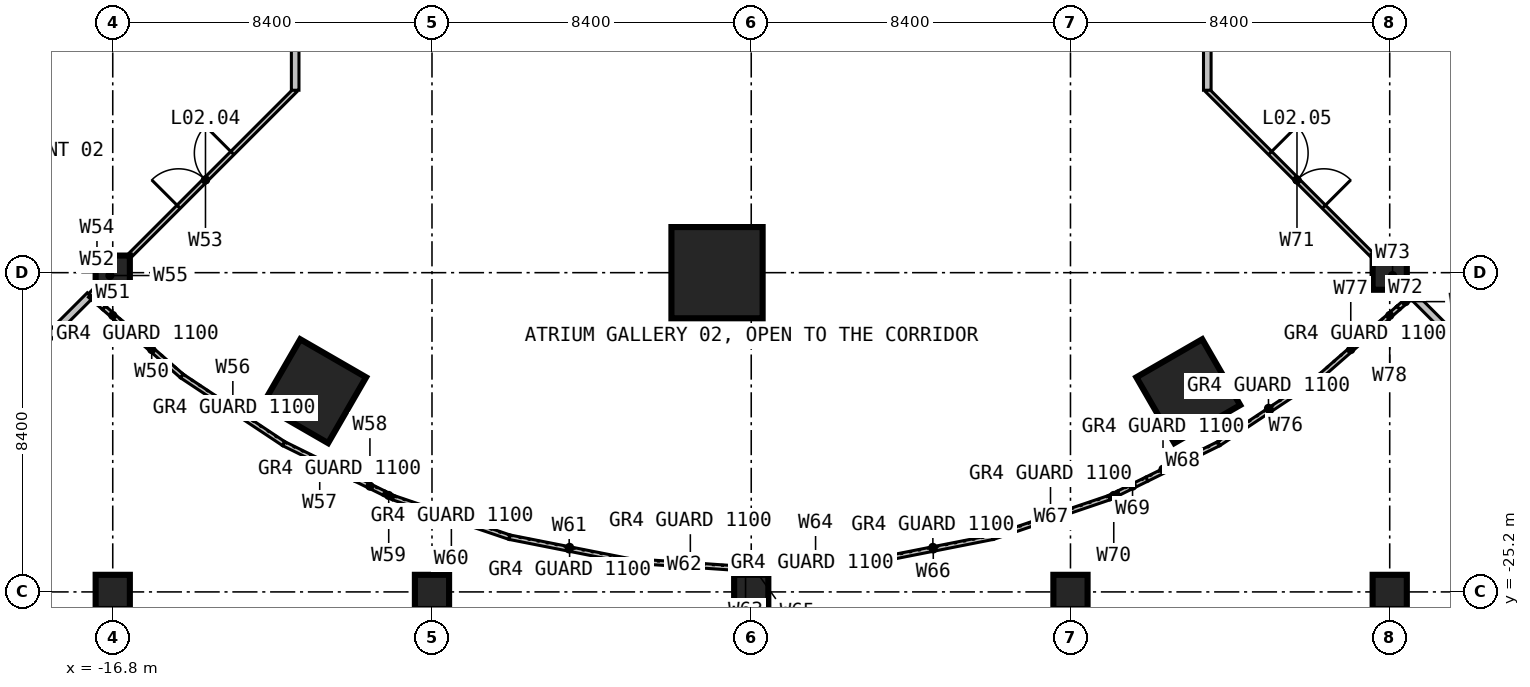
"""IFC4 building model, lengths in metres.
Left out: names, types, materials, properties, quantities, classifications, styles, units other than length and angle.
Written with IfcOpenShell. Run it as: python <this file> out.ifc"""

import sys

from ifc_helpers import new_model, si_unit, direction, frame, frame_2d, origin, origin_2d, place, context, subcontext, project, spatial, rectangle, hollow_rectangle, extrude, element, fill, save


model = new_model("IFC4")
c1 = context("Model", 3, precision=1e-05, world=origin(), true_north=direction((0.0, 1.0)))
c2 = subcontext(c1, "Body", "Model", "MODEL_VIEW")
j1 = project(units=[si_unit("LENGTHUNIT", "METRE"), si_unit("PLANEANGLEUNIT", "RADIAN")], contexts=[c1])
p1 = place(None, origin())
s1 = spatial("IfcSite", under=j1, at=p1, CompositionType="ELEMENT")
p2 = place(p1, origin())
s2 = spatial("IfcBuilding", under=s1, at=p2, CompositionType="ELEMENT")
p3 = place(p2, frame((0.0, 0.0, 11.0)))
s3 = spatial("IfcBuildingStorey", under=s2, at=p3, CompositionType="ELEMENT", Elevation=11.0)
for number, where, z_axis, x_axis in (
    (1, (-16.8, -25.2, 0.0), (0.0, 0.0, 1.0), (1.0, 0.0, 0.0)),
    (2, (-16.8, -16.8, 0.0), (0.0, 0.0, 1.0), (1.0, 0.0, 0.0)),
    (3, (-8.4, -25.2, 0.0), (0.0, 0.0, 1.0), (1.0, 0.0, 0.0)),
    (4, (0.0, -25.2, 0.0), (0.0, 0.0, 1.0), (1.0, 0.0, 0.0)),
):
    element("IfcColumn", number, at=place(p3, frame(where, z_axis=z_axis, x_axis=x_axis)), inside=s3, PredefinedType="COLUMN", context=c2, shape_type="SweptSolid", body=[
        extrude(rectangle(XDim=0.9, YDim=0.9, at=origin_2d()), origin(), (0.0, 0.0, 1.0), 5.0),
    ])
p4 = place(p3, frame((-0.9, -16.8, 0.0), z_axis=(0.0, 0.0, 1.0), x_axis=(1.0, 0.0, 0.0)))
e5 = element("IfcColumn", 5, at=p4, inside=s3, PredefinedType="COLUMN", context=c2, shape_type="SweptSolid", body=[
    extrude(rectangle(XDim=2.4, YDim=2.4, at=origin_2d()), origin(), (0.0, 0.0, 1.0), 5.0),
])
for number, where, z_axis, x_axis in (
    (6, (8.4, -25.2, 0.0), (0.0, 0.0, 1.0), (1.0, 0.0, 0.0)),
    (7, (16.8, -25.2, 0.0), (0.0, 0.0, 1.0), (1.0, 0.0, 0.0)),
    (8, (16.8, -16.8, 0.0), (0.0, 0.0, 1.0), (1.0, 0.0, 0.0)),
):
    element("IfcColumn", number, at=place(p3, frame(where, z_axis=z_axis, x_axis=x_axis)), inside=s3, PredefinedType="COLUMN", context=c2, shape_type="SweptSolid", body=[
        extrude(rectangle(XDim=0.9, YDim=0.9, at=origin_2d()), origin(), (0.0, 0.0, 1.0), 5.0),
    ])
for number, where, z_axis, x_axis in (
    (9, (-11.5, -19.919, 0.0), (0.0, 0.0, 1.0), (-0.5, -0.866, 0.0)),
    (10, (11.5, -19.919, 0.0), (0.0, 0.0, 1.0), (0.5, -0.866, 0.0)),
):
    element("IfcColumn", number, at=place(p3, frame(where, z_axis=z_axis, x_axis=x_axis)), inside=s3, PredefinedType="COLUMN", context=c2, shape_type="SweptSolid", body=[
        extrude(hollow_rectangle(XDim=2.0, YDim=2.0, WallThickness=0.24, at=origin_2d()), origin(), (0.0, 0.0, 1.0), 5.0),
    ])
p5 = place(p3, frame((-24.486, -24.486, 0.0), z_axis=(0.0, 0.0, 1.0), x_axis=(0.707106781187, 0.707106781187, 0.0)))
e11 = element("IfcWall", 11, at=p5, inside=s3, PredefinedType="PARTITIONING", context=c2, shape_type="SweptSolid", body=[
    extrude(rectangle(XDim=10.022, YDim=0.2, at=frame_2d((5.011, 0.0))), origin(), (0.0, 0.0, 1.0), 4.7),
])
p6 = place(p3, frame((-16.57, -18.127, 0.0), z_axis=(0.0, 0.0, 1.0), x_axis=(0.752226011438, -0.658905173538, 0.0)))
e12 = element("IfcWall", 12, at=p6, inside=s3, PredefinedType="PARTITIONING", context=c2, shape_type="SweptSolid", body=[
    extrude(rectangle(XDim=2.114, YDim=0.12, at=frame_2d((1.057, 0.0))), origin(), (0.0, 0.0, 1.0), 4.7),
])
p7 = place(p3, frame((-17.03, -17.724, 0.0), z_axis=(0.0, 0.0, 1.0), x_axis=(0.752081905539, -0.65906965289, 0.0)))
e13 = element("IfcWall", 13, at=p7, inside=s3, PredefinedType="PARTITIONING", context=c2, shape_type="SweptSolid", body=[
    extrude(rectangle(XDim=0.612, YDim=0.12, at=frame_2d((0.306, 0.0))), origin(), (0.0, 0.0, 1.0), 4.3),
])
p8 = place(p3, frame((-17.4, -17.4, 0.0), z_axis=(0.0, 0.0, 1.0), x_axis=(0.751992181934, -0.659172024824, 0.0)))
e14 = element("IfcWall", 14, at=p8, inside=s3, PredefinedType="PARTITIONING", context=c2, shape_type="SweptSolid", body=[
    extrude(rectangle(XDim=0.492, YDim=0.12, at=frame_2d((0.246, 0.0))), origin(), (0.0, 0.0, 1.0), 4.7),
])
p9 = place(p3, frame((-16.72, -16.72, 0.0), z_axis=(0.0, 0.0, 1.0), x_axis=(0.707106781187, 0.707106781187, 0.0)))
e15 = element("IfcWall", 15, at=p9, inside=s3, PredefinedType="PARTITIONING", context=c2, shape_type="SweptSolid", body=[
    extrude(rectangle(XDim=6.675, YDim=0.12, at=frame_2d((3.337, 0.0))), origin(), (0.0, 0.0, 1.0), 4.7),
])
p10 = place(p9, frame((2.338, 0.0, 0.0)))
e16 = element("IfcOpeningElement", 16, at=p10, cuts=e15, PredefinedType="OPENING", context=c2, shape_type="SweptSolid", body=[
    extrude(rectangle(XDim=2.0, YDim=2.4, at=frame_2d((1.0, 1.2))), frame((0.0, 0.07, 0.0), z_axis=(0.0, -1.0, 0.0), x_axis=(1.0, 0.0, 0.0)), (0.0, 0.0, 1.0), 0.14),
])
p11 = place(p3, frame((-17.4, -17.4, 0.0), z_axis=(0.0, 0.0, 1.0), x_axis=(0.707106781187, 0.707106781187, 0.0)))
e17 = element("IfcWall", 17, at=p11, inside=s3, PredefinedType="PARTITIONING", context=c2, shape_type="SweptSolid", body=[
    extrude(rectangle(XDim=0.523, YDim=0.12, at=frame_2d((0.262, 0.0))), origin(), (0.0, 0.0, 1.0), 4.7),
])
p12 = place(p3, frame((-17.03, -17.03, 0.0), z_axis=(0.0, 0.0, 1.0), x_axis=(0.707106781187, 0.707106781187, 0.0)))
e18 = element("IfcWall", 18, at=p12, inside=s3, PredefinedType="PARTITIONING", context=c2, shape_type="SweptSolid", body=[
    extrude(rectangle(XDim=0.438, YDim=0.12, at=frame_2d((0.219, 0.0))), origin(), (0.0, 0.0, 1.0), 4.3),
])
p13 = place(p3, frame((-14.98, -19.52, 0.0), z_axis=(0.0, 0.0, 1.0), x_axis=(0.832994734858, -0.553280915719, 0.0)))
e19 = element("IfcWall", 19, at=p13, inside=s3, PredefinedType="PARTITIONING", context=c2, shape_type="SweptSolid", body=[
    extrude(rectangle(XDim=3.217, YDim=0.12, at=frame_2d((1.609, 0.0))), origin(), (0.0, 0.0, 1.0), 4.7),
])
p14 = place(p3, frame((-12.3, -21.3, 0.0), z_axis=(0.0, 0.0, 1.0), x_axis=(0.896913641042, -0.442205744551, 0.0)))
e20 = element("IfcWall", 20, at=p14, inside=s3, PredefinedType="PARTITIONING", context=c2, shape_type="SweptSolid", body=[
    extrude(rectangle(XDim=2.109, YDim=0.12, at=frame_2d((1.055, 0.0))), origin(), (0.0, 0.0, 1.0), 4.7),
])
p15 = place(p3, frame((-10.408, -22.233, 0.0), z_axis=(0.0, 0.0, 1.0), x_axis=(0.896921584296, -0.442189633103, 0.0)))
e21 = element("IfcWall", 21, at=p15, inside=s3, PredefinedType="PARTITIONING", context=c2, shape_type="SweptSolid", body=[
    extrude(rectangle(XDim=0.837, YDim=0.12, at=frame_2d((0.418, 0.0))), origin(), (0.0, 0.0, 1.0), 4.3),
])
p16 = place(p3, frame((-9.658, -22.603, 0.0), z_axis=(0.0, 0.0, 1.0), x_axis=(0.896990941369, -0.442048923878, 0.0)))
e22 = element("IfcWall", 22, at=p16, inside=s3, PredefinedType="PARTITIONING", context=c2, shape_type="SweptSolid", body=[
    extrude(rectangle(XDim=0.265, YDim=0.12, at=frame_2d((0.133, 0.0))), origin(), (0.0, 0.0, 1.0), 4.7),
])
p17 = place(p3, frame((-9.42, -22.72, 0.0), z_axis=(0.0, 0.0, 1.0), x_axis=(0.946800830057, -0.321820117773, 0.0)))
e23 = element("IfcWall", 23, at=p17, inside=s3, PredefinedType="PARTITIONING", context=c2, shape_type="SweptSolid", body=[
    extrude(rectangle(XDim=3.232, YDim=0.12, at=frame_2d((1.616, 0.0))), origin(), (0.0, 0.0, 1.0), 4.7),
])
p18 = place(p3, frame((-6.36, -23.76, 0.0), z_axis=(0.0, 0.0, 1.0), x_axis=(0.98106754531, -0.193665876033, 0.0)))
e24 = element("IfcWall", 24, at=p18, inside=s3, PredefinedType="PARTITIONING", context=c2, shape_type="SweptSolid", body=[
    extrude(rectangle(XDim=3.201, YDim=0.12, at=frame_2d((1.6, 0.0))), origin(), (0.0, 0.0, 1.0), 4.7),
])
p19 = place(p3, frame((-3.22, -24.38, 0.0), z_axis=(0.0, 0.0, 1.0), x_axis=(0.997672751552, -0.068184168332, 0.0)))
e25 = element("IfcWall", 25, at=p19, inside=s3, PredefinedType="PARTITIONING", context=c2, shape_type="SweptSolid", body=[
    extrude(rectangle(XDim=2.929, YDim=0.12, at=frame_2d((1.464, 0.0))), origin(), (0.0, 0.0, 1.0), 4.7),
])
p20 = place(p3, frame((-0.298, -24.58, 0.0), z_axis=(0.0, 0.0, 1.0), x_axis=(0.997638063988, -0.068689833914, 0.0)))
e26 = element("IfcWall", 26, at=p20, inside=s3, PredefinedType="PARTITIONING", context=c2, shape_type="SweptSolid", body=[
    extrude(rectangle(XDim=0.299, YDim=0.12, at=frame_2d((0.149, 0.0))), origin(), (0.0, 0.0, 1.0), 4.3),
])
p21 = place(p3, frame((0.166, -24.589, 0.0), z_axis=(0.0, 0.0, 1.0), x_axis=(0.997672608774, 0.068186257434, 0.0)))
e27 = element("IfcWall", 27, at=p21, inside=s3, PredefinedType="PARTITIONING", context=c2, shape_type="SweptSolid", body=[
    extrude(rectangle(XDim=3.061, YDim=0.12, at=frame_2d((1.531, 0.0))), origin(), (0.0, 0.0, 1.0), 4.7),
])
p22 = place(p3, frame((0.0, -24.6, 0.0), z_axis=(0.0, 0.0, 1.0), x_axis=(0.997612909128, 0.069054207259, 0.0)))
e28 = element("IfcWall", 28, at=p22, inside=s3, PredefinedType="PARTITIONING", context=c2, shape_type="SweptSolid", body=[
    extrude(rectangle(XDim=0.166, YDim=0.12, at=frame_2d((0.083, 0.0))), origin(), (0.0, 0.0, 1.0), 4.3),
])
p23 = place(p3, frame((3.22, -24.38, 0.0), z_axis=(0.0, 0.0, 1.0), x_axis=(0.98106754531, 0.193665876033, 0.0)))
e29 = element("IfcWall", 29, at=p23, inside=s3, PredefinedType="PARTITIONING", context=c2, shape_type="SweptSolid", body=[
    extrude(rectangle(XDim=3.201, YDim=0.12, at=frame_2d((1.6, 0.0))), origin(), (0.0, 0.0, 1.0), 4.7),
])
p24 = place(p3, frame((6.36, -23.76, 0.0), z_axis=(0.0, 0.0, 1.0), x_axis=(0.946800830057, 0.321820117773, 0.0)))
e30 = element("IfcWall", 30, at=p24, inside=s3, PredefinedType="PARTITIONING", context=c2, shape_type="SweptSolid", body=[
    extrude(rectangle(XDim=3.232, YDim=0.12, at=frame_2d((1.616, 0.0))), origin(), (0.0, 0.0, 1.0), 4.7),
])
p25 = place(p3, frame((10.408, -22.233, 0.0), z_axis=(0.0, 0.0, 1.0), x_axis=(0.896913641042, 0.442205744551, 0.0)))
e31 = element("IfcWall", 31, at=p25, inside=s3, PredefinedType="PARTITIONING", context=c2, shape_type="SweptSolid", body=[
    extrude(rectangle(XDim=2.109, YDim=0.12, at=frame_2d((1.055, 0.0))), origin(), (0.0, 0.0, 1.0), 4.7),
])
p26 = place(p3, frame((9.658, -22.603, 0.0), z_axis=(0.0, 0.0, 1.0), x_axis=(0.896921584296, 0.442189633103, 0.0)))
e32 = element("IfcWall", 32, at=p26, inside=s3, PredefinedType="PARTITIONING", context=c2, shape_type="SweptSolid", body=[
    extrude(rectangle(XDim=0.837, YDim=0.12, at=frame_2d((0.418, 0.0))), origin(), (0.0, 0.0, 1.0), 4.3),
])
p27 = place(p3, frame((9.42, -22.72, 0.0), z_axis=(0.0, 0.0, 1.0), x_axis=(0.896990941369, 0.442048923878, 0.0)))
e33 = element("IfcWall", 33, at=p27, inside=s3, PredefinedType="PARTITIONING", context=c2, shape_type="SweptSolid", body=[
    extrude(rectangle(XDim=0.265, YDim=0.12, at=frame_2d((0.133, 0.0))), origin(), (0.0, 0.0, 1.0), 4.7),
])
p28 = place(p3, frame((12.0, -12.0, 0.0), z_axis=(0.0, 0.0, 1.0), x_axis=(0.707106781187, -0.707106781187, 0.0)))
e34 = element("IfcWall", 34, at=p28, inside=s3, PredefinedType="PARTITIONING", context=c2, shape_type="SweptSolid", body=[
    extrude(rectangle(XDim=6.675, YDim=0.12, at=frame_2d((3.337, 0.0))), origin(), (0.0, 0.0, 1.0), 4.7),
])
p29 = place(p28, frame((2.338, 0.0, 0.0)))
e35 = element("IfcOpeningElement", 35, at=p29, cuts=e34, PredefinedType="OPENING", context=c2, shape_type="SweptSolid", body=[
    extrude(rectangle(XDim=2.0, YDim=2.4, at=frame_2d((1.0, 1.2))), frame((0.0, 0.07, 0.0), z_axis=(0.0, -1.0, 0.0), x_axis=(1.0, 0.0, 0.0)), (0.0, 0.0, 1.0), 0.14),
])
p30 = place(p3, frame((17.03, -17.03, 0.0), z_axis=(0.0, 0.0, 1.0), x_axis=(0.707106781187, -0.707106781187, 0.0)))
e36 = element("IfcWall", 36, at=p30, inside=s3, PredefinedType="PARTITIONING", context=c2, shape_type="SweptSolid", body=[
    extrude(rectangle(XDim=0.523, YDim=0.12, at=frame_2d((0.262, 0.0))), origin(), (0.0, 0.0, 1.0), 4.7),
])
p31 = place(p3, frame((16.72, -16.72, 0.0), z_axis=(0.0, 0.0, 1.0), x_axis=(0.707106781187, -0.707106781187, 0.0)))
e37 = element("IfcWall", 37, at=p31, inside=s3, PredefinedType="PARTITIONING", context=c2, shape_type="SweptSolid", body=[
    extrude(rectangle(XDim=0.438, YDim=0.12, at=frame_2d((0.219, 0.0))), origin(), (0.0, 0.0, 1.0), 4.3),
])
p32 = place(p3, frame((12.3, -21.3, 0.0), z_axis=(0.0, 0.0, 1.0), x_axis=(0.832994734858, 0.553280915719, 0.0)))
e38 = element("IfcWall", 38, at=p32, inside=s3, PredefinedType="PARTITIONING", context=c2, shape_type="SweptSolid", body=[
    extrude(rectangle(XDim=3.217, YDim=0.12, at=frame_2d((1.609, 0.0))), origin(), (0.0, 0.0, 1.0), 4.7),
])
p33 = place(p3, frame((14.98, -19.52, 0.0), z_axis=(0.0, 0.0, 1.0), x_axis=(0.752226011438, 0.658905173538, 0.0)))
e39 = element("IfcWall", 39, at=p33, inside=s3, PredefinedType="PARTITIONING", context=c2, shape_type="SweptSolid", body=[
    extrude(rectangle(XDim=2.114, YDim=0.12, at=frame_2d((1.057, 0.0))), origin(), (0.0, 0.0, 1.0), 4.7),
])
p34 = place(p3, frame((16.57, -18.127, 0.0), z_axis=(0.0, 0.0, 1.0), x_axis=(0.752081905539, 0.65906965289, 0.0)))
e40 = element("IfcWall", 40, at=p34, inside=s3, PredefinedType="PARTITIONING", context=c2, shape_type="SweptSolid", body=[
    extrude(rectangle(XDim=0.612, YDim=0.12, at=frame_2d((0.306, 0.0))), origin(), (0.0, 0.0, 1.0), 4.3),
])
p35 = place(p3, frame((17.03, -17.724, 0.0), z_axis=(0.0, 0.0, 1.0), x_axis=(0.751992181934, 0.659172024824, 0.0)))
e41 = element("IfcWall", 41, at=p35, inside=s3, PredefinedType="PARTITIONING", context=c2, shape_type="SweptSolid", body=[
    extrude(rectangle(XDim=0.492, YDim=0.12, at=frame_2d((0.246, 0.0))), origin(), (0.0, 0.0, 1.0), 4.7),
])
p36 = place(p3, frame((17.4, -17.4, 0.0), z_axis=(0.0, 0.0, 1.0), x_axis=(0.707106781187, -0.707106781187, 0.0)))
e42 = element("IfcWall", 42, at=p36, inside=s3, PredefinedType="PARTITIONING", context=c2, shape_type="SweptSolid", body=[
    extrude(rectangle(XDim=10.022, YDim=0.2, at=frame_2d((5.011, 0.0))), origin(), (0.0, 0.0, 1.0), 4.7),
])
for number, where, z_axis, x_axis in (
    (43, (12.0, -12.0, 0.0), (0.0, 0.0, 1.0), (0.0, 1.0, 0.0)),
    (44, (-12.0, 0.0, 0.0), (0.0, 0.0, 1.0), (0.0, -1.0, 0.0)),
):
    element("IfcWall", number, at=place(p3, frame(where, z_axis=z_axis, x_axis=x_axis)), inside=s3, PredefinedType="PARTITIONING", context=c2, shape_type="SweptSolid", body=[
        extrude(rectangle(XDim=12.0, YDim=0.2, at=frame_2d((6.0, 0.0))), origin(), (0.0, 0.0, 1.0), 4.7),
    ])
p37 = place(p10, origin())
e45 = element("IfcDoor", 45, at=p37, inside=s3, OperationType="DOUBLE_DOOR_SINGLE_SWING", PredefinedType="DOOR", context=c2, shape_type="SweptSolid", body=[
    extrude(rectangle(XDim=2.0, YDim=2.4, at=frame_2d((1.0, 1.2))), frame((0.0, 0.025, 0.0), z_axis=(0.0, -1.0, 0.0), x_axis=(1.0, 0.0, 0.0)), (0.0, 0.0, 1.0), 0.05),
])
fill(e16, e45)
p38 = place(p29, origin())
e46 = element("IfcDoor", 46, at=p38, inside=s3, OperationType="DOUBLE_DOOR_SINGLE_SWING", PredefinedType="DOOR", context=c2, shape_type="SweptSolid", body=[
    extrude(rectangle(XDim=2.0, YDim=2.4, at=frame_2d((1.0, 1.2))), frame((0.0, 0.025, 0.0), z_axis=(0.0, -1.0, 0.0), x_axis=(1.0, 0.0, 0.0)), (0.0, 0.0, 1.0), 0.05),
])
fill(e35, e46)
save(model, sys.argv[1])
